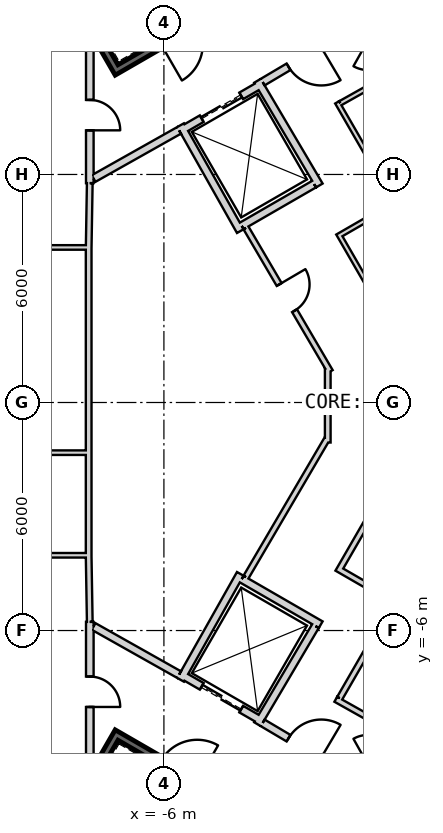
"""IFC4 building model, lengths in metres.
Left out: names, types, materials, properties, quantities, classifications, styles, units other than length and angle.
Written with IfcOpenShell. Run it as: python <this file> out.ifc"""

import sys

from ifc_helpers import new_model, si_unit, direction, frame, frame_2d, origin, place, context, subcontext, project, spatial, rectangle, extrude, element, fill, save


model = new_model("IFC4")
c1 = context("Model", 3, precision=1e-05, world=origin(), true_north=direction((0.0, 1.0)))
c2 = subcontext(c1, "Body", "Model", "MODEL_VIEW")
j1 = project(units=[si_unit("LENGTHUNIT", "METRE"), si_unit("PLANEANGLEUNIT", "RADIAN")], contexts=[c1])
p1 = place(None, origin())
s1 = spatial("IfcSite", under=j1, at=p1, CompositionType="ELEMENT")
p2 = place(p1, origin())
s2 = spatial("IfcBuilding", under=s1, at=p2, CompositionType="ELEMENT")
p3 = place(p2, frame((0.0, 0.0, 410.3)))
s3 = spatial("IfcBuildingStorey", under=s2, at=p3, CompositionType="ELEMENT", Elevation=410.3)
p4 = place(p3, frame((19.475, 2.208, 0.0), z_axis=(0.0, 0.0, 1.0), x_axis=(-0.866028369851, 0.499994862586, 0.0)))
e1 = element("IfcWall", 1, at=p4, inside=s3, PredefinedType="SHEAR", context=c2, shape_type="SweptSolid", body=[
    extrude(rectangle(XDim=31.523, YDim=0.9, at=frame_2d((15.762, 0.0))), origin(), (0.0, 0.0, 1.0), 5.0),
])
p5 = place(p4, frame((3.612, 0.0, 0.0)))
e2 = element("IfcOpeningElement", 2, at=p5, cuts=e1, PredefinedType="OPENING", context=c2, shape_type="SweptSolid", body=[
    extrude(rectangle(XDim=1.2, YDim=2.4, at=frame_2d((0.6, 1.2))), frame((0.0, 0.46, 0.0), z_axis=(0.0, -1.0, 0.0), x_axis=(1.0, 0.0, 0.0)), (0.0, 0.0, 1.0), 0.92),
])
p6 = place(p4, frame((26.712, 0.0, 0.0)))
e3 = element("IfcOpeningElement", 3, at=p6, cuts=e1, PredefinedType="OPENING", context=c2, shape_type="SweptSolid", body=[
    extrude(rectangle(XDim=1.2, YDim=2.4, at=frame_2d((0.6, 1.2))), frame((0.0, 0.46, 0.0), z_axis=(0.0, -1.0, 0.0), x_axis=(1.0, 0.0, 0.0)), (0.0, 0.0, 1.0), 0.92),
])
p7 = place(p3, frame((-7.825, -17.97, 0.0), z_axis=(0.0, 0.0, 1.0), x_axis=(0.866028369851, 0.499994862586, 0.0)))
e4 = element("IfcWall", 4, at=p7, inside=s3, PredefinedType="SHEAR", context=c2, shape_type="SweptSolid", body=[
    extrude(rectangle(XDim=31.523, YDim=0.9, at=frame_2d((15.762, 0.0))), origin(), (0.0, 0.0, 1.0), 5.0),
])
p8 = place(p7, frame((17.862, 0.0, 0.0)))
e5 = element("IfcOpeningElement", 5, at=p8, cuts=e4, PredefinedType="OPENING", context=c2, shape_type="SweptSolid", body=[
    extrude(rectangle(XDim=1.2, YDim=2.4, at=frame_2d((0.6, 1.2))), frame((0.0, 0.46, 0.0), z_axis=(0.0, -1.0, 0.0), x_axis=(1.0, 0.0, 0.0)), (0.0, 0.0, 1.0), 0.92),
])
p9 = place(p7, frame((20.562, 0.0, 0.0)))
e6 = element("IfcOpeningElement", 6, at=p9, cuts=e4, PredefinedType="OPENING", context=c2, shape_type="SweptSolid", body=[
    extrude(rectangle(XDim=1.2, YDim=2.4, at=frame_2d((0.6, 1.2))), frame((0.0, 0.46, 0.0), z_axis=(0.0, -1.0, 0.0), x_axis=(1.0, 0.0, 0.0)), (0.0, 0.0, 1.0), 0.92),
])
p10 = place(p7, frame((26.712, 0.0, 0.0)))
e7 = element("IfcOpeningElement", 7, at=p10, cuts=e4, PredefinedType="OPENING", context=c2, shape_type="SweptSolid", body=[
    extrude(rectangle(XDim=1.2, YDim=2.4, at=frame_2d((0.6, 1.2))), frame((0.0, 0.46, 0.0), z_axis=(0.0, -1.0, 0.0), x_axis=(1.0, 0.0, 0.0)), (0.0, 0.0, 1.0), 0.92),
])
p11 = place(p7, frame((3.612, 0.0, 0.0)))
e8 = element("IfcOpeningElement", 8, at=p11, cuts=e4, PredefinedType="OPENING", context=c2, shape_type="SweptSolid", body=[
    extrude(rectangle(XDim=1.2, YDim=2.4, at=frame_2d((0.6, 1.2))), frame((0.0, 0.46, 0.0), z_axis=(0.0, -1.0, 0.0), x_axis=(1.0, 0.0, 0.0)), (0.0, 0.0, 1.0), 0.92),
])
p12 = place(p3, frame((-1.186, -23.926, 0.0), z_axis=(0.0, 0.0, 1.0), x_axis=(0.824480875731, 0.565889817503, 0.0)))
e9 = element("IfcWall", 9, at=p12, inside=s3, PredefinedType="SOLIDWALL", context=c2, shape_type="SweptSolid", body=[
    extrude(rectangle(XDim=26.064, YDim=0.24, at=frame_2d((13.032, 0.0))), origin(), (0.0, 0.0, 1.0), 4.75),
])
p13 = place(p3, frame((-11.245, 15.678, -0.25), z_axis=(0.0, 0.0, 1.0), x_axis=(0.499977274689, -0.866038523851, 0.0)))
e10 = element("IfcWall", 10, at=p13, inside=s3, PredefinedType="SHEAR", context=c2, shape_type="SweptSolid", body=[
    extrude(rectangle(XDim=8.1, YDim=0.2, at=frame_2d((4.05, 0.0))), origin(), (0.0, 0.0, 1.0), 5.0),
])
p14 = place(p3, frame((-7.159, 8.8, -0.25), z_axis=(0.0, 0.0, 1.0), x_axis=(0.866047807691, 0.499961193289, 0.0)))
e11 = element("IfcWall", 11, at=p14, inside=s3, PredefinedType="SHEAR", context=c2, shape_type="SweptSolid", body=[
    extrude(rectangle(XDim=3.6, YDim=0.2, at=frame_2d((1.8, 0.0))), origin(), (0.0, 0.0, 1.0), 5.0),
])
p15 = place(p14, frame((1.25, 0.0, 0.25)))
e12 = element("IfcOpeningElement", 12, at=p15, cuts=e11, PredefinedType="OPENING", context=c2, shape_type="SweptSolid", body=[
    extrude(rectangle(XDim=1.1, YDim=2.1, at=frame_2d((0.55, 1.05))), frame((0.0, 0.11, 0.0), z_axis=(0.0, -1.0, 0.0), x_axis=(1.0, 0.0, 0.0)), (0.0, 0.0, 1.0), 0.22),
])
p16 = place(p3, frame((-5.524, 7.168, 0.0), z_axis=(0.0, 0.0, 1.0), x_axis=(0.866024647952, 0.500001309137, 0.0)))
e13 = element("IfcWall", 13, at=p16, inside=s3, PredefinedType="PLUMBINGWALL", context=c2, shape_type="SweptSolid", body=[
    extrude(rectangle(XDim=2.4, YDim=0.2, at=frame_2d((1.2, 0.0))), origin(), (0.0, 0.0, 1.0), 4.75),
])
p17 = place(p16, frame((0.6, 0.0, 0.0)))
e14 = element("IfcOpeningElement", 14, at=p17, cuts=e13, PredefinedType="OPENING", context=c2, shape_type="SweptSolid", body=[
    extrude(rectangle(XDim=1.2, YDim=2.4, at=frame_2d((0.6, 1.2))), frame((0.0, 0.11, 0.0), z_axis=(0.0, -1.0, 0.0), x_axis=(1.0, 0.0, 0.0)), (0.0, 0.0, 1.0), 0.22),
])
p18 = place(p3, frame((-2.047, 5.746, 0.0), z_axis=(0.0, 0.0, 1.0), x_axis=(-0.86605622881, -0.499946605688, 0.0)))
e15 = element("IfcWall", 15, at=p18, inside=s3, PredefinedType="PLUMBINGWALL", context=c2, shape_type="SweptSolid", body=[
    extrude(rectangle(XDim=2.2, YDim=0.2, at=frame_2d((1.1, 0.0))), origin(), (0.0, 0.0, 1.0), 4.75),
])
p19 = place(p3, frame((-3.99, 4.509, 0.0), z_axis=(0.0, 0.0, 1.0), x_axis=(-0.491358283181, 0.870957540612, 0.0)))
e16 = element("IfcWall", 16, at=p19, inside=s3, PredefinedType="PLUMBINGWALL", context=c2, shape_type="SweptSolid", body=[
    extrude(rectangle(XDim=3.2, YDim=0.2, at=frame_2d((1.6, 0.0))), origin(), (0.0, 0.0, 1.0), 4.75),
])
p20 = place(p3, frame((-3.538, 8.465, 0.0), z_axis=(0.0, 0.0, 1.0), x_axis=(0.508616218331, -0.860993346345, 0.0)))
e17 = element("IfcWall", 17, at=p20, inside=s3, PredefinedType="PLUMBINGWALL", context=c2, shape_type="SweptSolid", body=[
    extrude(rectangle(XDim=3.2, YDim=0.2, at=frame_2d((1.6, 0.0))), origin(), (0.0, 0.0, 1.0), 4.75),
])
p21 = place(p3, frame((-7.196, -8.663, -0.25), z_axis=(0.0, 0.0, 1.0), x_axis=(-0.499997992926, -0.866026562566, 0.0)))
e18 = element("IfcWall", 18, at=p21, inside=s3, PredefinedType="SHEAR", context=c2, shape_type="SweptSolid", body=[
    extrude(rectangle(XDim=7.9, YDim=0.2, at=frame_2d((3.95, 0.0))), origin(), (0.0, 0.0, 1.0), 5.0),
])
p22 = place(p3, frame((-4.041, -10.599, -0.25), z_axis=(0.0, 0.0, 1.0), x_axis=(-0.866047807691, 0.499961193289, 0.0)))
e19 = element("IfcWall", 19, at=p22, inside=s3, PredefinedType="SHEAR", context=c2, shape_type="SweptSolid", body=[
    extrude(rectangle(XDim=3.6, YDim=0.2, at=frame_2d((1.8, 0.0))), origin(), (0.0, 0.0, 1.0), 5.0),
])
p23 = place(p22, frame((1.25, 0.0, 0.25)))
e20 = element("IfcOpeningElement", 20, at=p23, cuts=e19, PredefinedType="OPENING", context=c2, shape_type="SweptSolid", body=[
    extrude(rectangle(XDim=1.1, YDim=2.1, at=frame_2d((0.55, 1.05))), frame((0.0, 0.11, 0.0), z_axis=(0.0, -1.0, 0.0), x_axis=(1.0, 0.0, 0.0)), (0.0, 0.0, 1.0), 0.22),
])
p24 = place(p3, frame((-3.446, -8.368, 0.0), z_axis=(0.0, 0.0, 1.0), x_axis=(-0.866024647952, 0.500001309137, 0.0)))
e21 = element("IfcWall", 21, at=p24, inside=s3, PredefinedType="PLUMBINGWALL", context=c2, shape_type="SweptSolid", body=[
    extrude(rectangle(XDim=2.4, YDim=0.2, at=frame_2d((1.2, 0.0))), origin(), (0.0, 0.0, 1.0), 4.75),
])
p25 = place(p24, frame((0.6, 0.0, 0.0)))
e22 = element("IfcOpeningElement", 22, at=p25, cuts=e21, PredefinedType="OPENING", context=c2, shape_type="SweptSolid", body=[
    extrude(rectangle(XDim=1.2, YDim=2.4, at=frame_2d((0.6, 1.2))), frame((0.0, 0.11, 0.0), z_axis=(0.0, -1.0, 0.0), x_axis=(1.0, 0.0, 0.0)), (0.0, 0.0, 1.0), 0.22),
])
p26 = place(p3, frame((-5.562, -7.296, 0.0), z_axis=(0.0, 0.0, 1.0), x_axis=(0.491358283181, 0.870957540612, 0.0)))
e23 = element("IfcWall", 23, at=p26, inside=s3, PredefinedType="PLUMBINGWALL", context=c2, shape_type="SweptSolid", body=[
    extrude(rectangle(XDim=3.2, YDim=0.2, at=frame_2d((1.6, 0.0))), origin(), (0.0, 0.0, 1.0), 4.75),
])
p27 = place(p3, frame((-3.953, -4.646, 0.0), z_axis=(0.0, 0.0, 1.0), x_axis=(0.866024647952, -0.500001309137, 0.0)))
e24 = element("IfcWall", 24, at=p27, inside=s3, PredefinedType="PLUMBINGWALL", context=c2, shape_type="SweptSolid", body=[
    extrude(rectangle(XDim=2.4, YDim=0.2, at=frame_2d((1.2, 0.0))), origin(), (0.0, 0.0, 1.0), 4.75),
])
p28 = place(p3, frame((-2.012, -5.882, 0.0), z_axis=(0.0, 0.0, 1.0), x_axis=(-0.508619639323, -0.860991325447, 0.0)))
e25 = element("IfcWall", 25, at=p28, inside=s3, PredefinedType="PLUMBINGWALL", context=c2, shape_type="SweptSolid", body=[
    extrude(rectangle(XDim=3.0, YDim=0.2, at=frame_2d((1.5, 0.0))), origin(), (0.0, 0.0, 1.0), 4.75),
])
p29 = place(p3, frame((-11.2, 4.08, 0.0), z_axis=(0.0, 0.0, 1.0), x_axis=(1.0, 0.0, 0.0)))
e26 = element("IfcWall", 26, at=p29, inside=s3, PredefinedType="PARTITIONING", context=c2, shape_type="SweptSolid", body=[
    extrude(rectangle(XDim=3.25, YDim=0.12, at=frame_2d((1.625, 0.0))), origin(), (0.0, 0.0, 1.0), 4.75),
])
p30 = place(p29, frame((1.225, 0.0, 0.0)))
e27 = element("IfcOpeningElement", 27, at=p30, cuts=e26, PredefinedType="OPENING", context=c2, shape_type="SweptSolid", body=[
    extrude(rectangle(XDim=0.8, YDim=2.1, at=frame_2d((0.4, 1.05))), frame((0.0, 0.07, 0.0), z_axis=(0.0, -1.0, 0.0), x_axis=(1.0, 0.0, 0.0)), (0.0, 0.0, 1.0), 0.14),
])
p31 = place(p3, frame((-7.95, -9.55, 0.0), z_axis=(0.0, 0.0, 1.0), x_axis=(0.0, 1.0, 0.0)))
e28 = element("IfcWall", 28, at=p31, inside=s3, PredefinedType="PARTITIONING", context=c2, shape_type="SweptSolid", body=[
    extrude(rectangle(XDim=3.778, YDim=0.2, at=frame_2d((1.889, 0.0))), origin(), (0.0, 0.0, 1.0), 4.75),
])
p32 = place(p31, frame((1.539, 0.0, 0.0)))
e29 = element("IfcOpeningElement", 29, at=p32, cuts=e28, PredefinedType="OPENING", context=c2, shape_type="SweptSolid", body=[
    extrude(rectangle(XDim=0.8, YDim=2.1, at=frame_2d((0.4, 1.05))), frame((0.0, 0.11, 0.0), z_axis=(0.0, -1.0, 0.0), x_axis=(1.0, 0.0, 0.0)), (0.0, 0.0, 1.0), 0.22),
])
p33 = place(p3, frame((-7.95, 5.772, 0.0), z_axis=(0.0, 0.0, 1.0), x_axis=(0.0, 1.0, 0.0)))
e30 = element("IfcWall", 30, at=p33, inside=s3, PredefinedType="PARTITIONING", context=c2, shape_type="SweptSolid", body=[
    extrude(rectangle(XDim=3.578, YDim=0.2, at=frame_2d((1.789, 0.0))), origin(), (0.0, 0.0, 1.0), 4.75),
])
p34 = place(p33, frame((1.389, 0.0, 0.0)))
e31 = element("IfcOpeningElement", 31, at=p34, cuts=e30, PredefinedType="OPENING", context=c2, shape_type="SweptSolid", body=[
    extrude(rectangle(XDim=0.8, YDim=2.1, at=frame_2d((0.4, 1.05))), frame((0.0, 0.11, 0.0), z_axis=(0.0, -1.0, 0.0), x_axis=(1.0, 0.0, 0.0)), (0.0, 0.0, 1.0), 0.22),
])
p35 = place(p3, frame((-7.951, 5.772, 0.0), z_axis=(0.0, 0.0, 1.0), x_axis=(-0.016723387416, -0.999860154378, 0.0)))
e32 = element("IfcWall", 32, at=p35, inside=s3, PredefinedType="PLUMBINGWALL", context=c2, shape_type="SweptSolid", body=[
    extrude(rectangle(XDim=1.723, YDim=0.15, at=frame_2d((0.861, 0.0))), origin(), (0.0, 0.0, 1.0), 4.75),
])
p36 = place(p3, frame((-11.2, -1.32, 0.0), z_axis=(0.0, 0.0, 1.0), x_axis=(1.0, 0.0, 0.0)))
e33 = element("IfcWall", 33, at=p36, inside=s3, PredefinedType="PARTITIONING", context=c2, shape_type="SweptSolid", body=[
    extrude(rectangle(XDim=3.25, YDim=0.12, at=frame_2d((1.625, 0.0))), origin(), (0.0, 0.0, 1.0), 4.75),
])
p37 = place(p36, frame((1.225, 0.0, 0.0)))
e34 = element("IfcOpeningElement", 34, at=p37, cuts=e33, PredefinedType="OPENING", context=c2, shape_type="SweptSolid", body=[
    extrude(rectangle(XDim=0.8, YDim=2.1, at=frame_2d((0.4, 1.05))), frame((0.0, 0.07, 0.0), z_axis=(0.0, -1.0, 0.0), x_axis=(1.0, 0.0, 0.0)), (0.0, 0.0, 1.0), 0.14),
])
p38 = place(p3, frame((-7.98, 4.05, 0.0), z_axis=(0.0, 0.0, 1.0), x_axis=(0.0, -1.0, 0.0)))
e35 = element("IfcWall", 35, at=p38, inside=s3, PredefinedType="PLUMBINGWALL", context=c2, shape_type="SweptSolid", body=[
    extrude(rectangle(XDim=8.1, YDim=0.15, at=frame_2d((4.05, 0.0))), origin(), (0.0, 0.0, 1.0), 4.75),
])
p39 = place(p3, frame((-7.95, -4.02, 0.0), z_axis=(0.0, 0.0, 1.0), x_axis=(-1.0, 0.0, 0.0)))
e36 = element("IfcWall", 36, at=p39, inside=s3, PredefinedType="PARTITIONING", context=c2, shape_type="SweptSolid", body=[
    extrude(rectangle(XDim=3.25, YDim=0.12, at=frame_2d((1.625, 0.0))), origin(), (0.0, 0.0, 1.0), 4.75),
])
p40 = place(p3, frame((-7.98, -4.05, 0.0), z_axis=(0.0, 0.0, 1.0), x_axis=(0.016723387416, -0.999860154378, 0.0)))
e37 = element("IfcWall", 37, at=p40, inside=s3, PredefinedType="PLUMBINGWALL", context=c2, shape_type="SweptSolid", body=[
    extrude(rectangle(XDim=1.723, YDim=0.15, at=frame_2d((0.861, 0.0))), origin(), (0.0, 0.0, 1.0), 4.75),
])
p41 = place(p3, frame((-1.024, 9.772, 0.0), z_axis=(0.0, 0.0, 1.0), x_axis=(0.871968924608, -0.489561226527, 0.0)))
e38 = element("IfcWall", 38, at=p41, inside=s3, PredefinedType="PARTITIONING", context=c2, shape_type="SweptSolid", body=[
    extrude(rectangle(XDim=1.722, YDim=0.12, at=frame_2d((0.861, 0.0))), origin(), (0.0, 0.0, 1.0), 4.75),
])
p42 = place(p41, frame((0.461, 0.0, 0.0)))
e39 = element("IfcOpeningElement", 39, at=p42, cuts=e38, PredefinedType="OPENING", context=c2, shape_type="SweptSolid", body=[
    extrude(rectangle(XDim=0.8, YDim=2.1, at=frame_2d((0.4, 1.05))), frame((0.0, 0.07, 0.0), z_axis=(0.0, -1.0, 0.0), x_axis=(1.0, 0.0, 0.0)), (0.0, 0.0, 1.0), 0.14),
])
p43 = place(p3, frame((0.478, -8.928, 0.0), z_axis=(0.0, 0.0, 1.0), x_axis=(-0.871968924608, -0.489561226527, 0.0)))
e40 = element("IfcWall", 40, at=p43, inside=s3, PredefinedType="PARTITIONING", context=c2, shape_type="SweptSolid", body=[
    extrude(rectangle(XDim=1.722, YDim=0.12, at=frame_2d((0.861, 0.0))), origin(), (0.0, 0.0, 1.0), 4.75),
])
p44 = place(p43, frame((0.461, 0.0, 0.0)))
e41 = element("IfcOpeningElement", 41, at=p44, cuts=e40, PredefinedType="OPENING", context=c2, shape_type="SweptSolid", body=[
    extrude(rectangle(XDim=0.8, YDim=2.1, at=frame_2d((0.4, 1.05))), frame((0.0, 0.07, 0.0), z_axis=(0.0, -1.0, 0.0), x_axis=(1.0, 0.0, 0.0)), (0.0, 0.0, 1.0), 0.14),
])
p45 = place(p3, frame((-5.6, 7.16, 0.0), z_axis=(0.0, 0.0, 1.0), x_axis=(-0.871350695252, -0.490660744185, 0.0)))
e42 = element("IfcWall", 42, at=p45, inside=s3, PredefinedType="PARTITIONING", context=c2, shape_type="SweptSolid", body=[
    extrude(rectangle(XDim=2.582, YDim=0.2, at=frame_2d((1.291, 0.0))), origin(), (0.0, 0.0, 1.0), 4.75),
])
p46 = place(p3, frame((-1.179, 9.745, 0.0), z_axis=(0.0, 0.0, 1.0), x_axis=(-0.860630814782, -0.509229418482, 0.0)))
e43 = element("IfcWall", 43, at=p46, inside=s3, PredefinedType="PARTITIONING", context=c2, shape_type="SweptSolid", body=[
    extrude(rectangle(XDim=2.582, YDim=0.2, at=frame_2d((1.291, 0.0))), origin(), (0.0, 0.0, 1.0), 4.75),
])
p47 = place(p46, frame((0.791, 0.0, 0.0)))
e44 = element("IfcOpeningElement", 44, at=p47, cuts=e43, PredefinedType="OPENING", context=c2, shape_type="SweptSolid", body=[
    extrude(rectangle(XDim=1.0, YDim=2.1, at=frame_2d((0.5, 1.05))), frame((0.0, 0.11, 0.0), z_axis=(0.0, -1.0, 0.0), x_axis=(1.0, 0.0, 0.0)), (0.0, 0.0, 1.0), 0.22),
])
p48 = place(p3, frame((-7.85, -5.893, 0.0), z_axis=(0.0, 0.0, 1.0), x_axis=(0.871350695252, -0.490660744185, 0.0)))
e45 = element("IfcWall", 45, at=p48, inside=s3, PredefinedType="PARTITIONING", context=c2, shape_type="SweptSolid", body=[
    extrude(rectangle(XDim=2.582, YDim=0.2, at=frame_2d((1.291, 0.0))), origin(), (0.0, 0.0, 1.0), 4.75),
])
p49 = place(p3, frame((-3.401, -8.43, 0.0), z_axis=(0.0, 0.0, 1.0), x_axis=(0.860630814782, -0.509229418482, 0.0)))
e46 = element("IfcWall", 46, at=p49, inside=s3, PredefinedType="PARTITIONING", context=c2, shape_type="SweptSolid", body=[
    extrude(rectangle(XDim=2.582, YDim=0.2, at=frame_2d((1.291, 0.0))), origin(), (0.0, 0.0, 1.0), 4.75),
])
p50 = place(p49, frame((0.791, 0.0, 0.0)))
e47 = element("IfcOpeningElement", 47, at=p50, cuts=e46, PredefinedType="OPENING", context=c2, shape_type="SweptSolid", body=[
    extrude(rectangle(XDim=1.0, YDim=2.1, at=frame_2d((0.5, 1.05))), frame((0.0, 0.11, 0.0), z_axis=(0.0, -1.0, 0.0), x_axis=(1.0, 0.0, 0.0)), (0.0, 0.0, 1.0), 0.22),
])
p51 = place(p3, frame((-1.624, 0.815, 0.0), z_axis=(0.0, 0.0, 1.0), x_axis=(-0.505868173579, 0.862610799237, 0.0)))
e48 = element("IfcWall", 48, at=p51, inside=s3, PredefinedType="PLUMBINGWALL", context=c2, shape_type="SweptSolid", body=[
    extrude(rectangle(XDim=4.383, YDim=0.15, at=frame_2d((2.191, 0.0))), origin(), (0.0, 0.0, 1.0), 4.75),
])
p52 = place(p51, frame((1.855, 0.0, 0.0)))
e49 = element("IfcOpeningElement", 49, at=p52, cuts=e48, PredefinedType="OPENING", context=c2, shape_type="SweptSolid", body=[
    extrude(rectangle(XDim=0.8, YDim=2.1, at=frame_2d((0.4, 1.05))), frame((0.0, 0.085, 0.0), z_axis=(0.0, -1.0, 0.0), x_axis=(1.0, 0.0, 0.0)), (0.0, 0.0, 1.0), 0.17),
])
p53 = place(p3, frame((-1.689, -1.053, 0.0), z_axis=(0.0, 0.0, 1.0), x_axis=(0.0, 1.0, 0.0)))
e50 = element("IfcWall", 50, at=p53, inside=s3, PredefinedType="PLUMBINGWALL", context=c2, shape_type="SweptSolid", body=[
    extrude(rectangle(XDim=1.954, YDim=0.15, at=frame_2d((0.977, 0.0))), origin(), (0.0, 0.0, 1.0), 4.75),
])
p54 = place(p3, frame((-3.841, -4.595, 0.0), z_axis=(0.0, 0.0, 1.0), x_axis=(0.505857207696, 0.862617229959, 0.0)))
e51 = element("IfcWall", 51, at=p54, inside=s3, PredefinedType="PLUMBINGWALL", context=c2, shape_type="SweptSolid", body=[
    extrude(rectangle(XDim=4.231, YDim=0.15, at=frame_2d((2.116, 0.0))), origin(), (0.0, 0.0, 1.0), 4.75),
])
p55 = place(p3, frame((-1.477, -7.808, 0.0), z_axis=(0.0, 0.0, 1.0), x_axis=(0.871822901869, -0.48982122022, 0.0)))
e52 = element("IfcWall", 52, at=p55, inside=s3, PredefinedType="PLUMBINGWALL", context=c2, shape_type="SweptSolid", body=[
    extrude(rectangle(XDim=2.24, YDim=0.15, at=frame_2d((1.12, 0.0))), origin(), (0.0, 0.0, 1.0), 4.75),
])
p56 = place(p3, frame((0.126, -5.182, 0.0), z_axis=(0.0, 0.0, 1.0), x_axis=(-0.499990139034, -0.866031096941, 0.0)))
e53 = element("IfcWall", 53, at=p56, inside=s3, PredefinedType="PLUMBINGWALL", context=c2, shape_type="SweptSolid", body=[
    extrude(rectangle(XDim=3.0, YDim=0.15, at=frame_2d((1.5, 0.0))), origin(), (0.0, 0.0, 1.0), 4.75),
])
p57 = place(p3, frame((-1.449, -4.36, 0.0), z_axis=(0.0, 0.0, 1.0), x_axis=(0.866025371046, -0.500000056704, 0.0)))
e54 = element("IfcWall", 54, at=p57, inside=s3, PredefinedType="PLUMBINGWALL", context=c2, shape_type="SweptSolid", body=[
    extrude(rectangle(XDim=1.7, YDim=0.15, at=frame_2d((0.85, 0.0))), origin(), (0.0, 0.0, 1.0), 4.75),
])
p58 = place(p3, frame((0.108, -1.812, 0.0), z_axis=(0.0, 0.0, 1.0), x_axis=(-0.49994762993, -0.866055637547, 0.0)))
e55 = element("IfcWall", 55, at=p58, inside=s3, PredefinedType="PLUMBINGWALL", context=c2, shape_type="SweptSolid", body=[
    extrude(rectangle(XDim=2.909, YDim=0.15, at=frame_2d((1.455, 0.0))), origin(), (0.0, 0.0, 1.0), 4.75),
])
p59 = place(p3, frame((-1.414, 4.449, 0.0), z_axis=(0.0, 0.0, 1.0), x_axis=(0.500028961621, -0.866008682139, 0.0)))
e56 = element("IfcWall", 56, at=p59, inside=s3, PredefinedType="PARTITIONING", context=c2, shape_type="SweptSolid", body=[
    extrude(rectangle(XDim=2.896, YDim=0.12, at=frame_2d((1.448, 0.0))), origin(), (0.0, 0.0, 1.0), 4.75),
])
p60 = place(p3, frame((0.14, 5.277, 0.0), z_axis=(0.0, 0.0, 1.0), x_axis=(-0.865989465428, -0.500062241894, 0.0)))
e57 = element("IfcWall", 57, at=p60, inside=s3, PredefinedType="PARTITIONING", context=c2, shape_type="SweptSolid", body=[
    extrude(rectangle(XDim=1.7, YDim=0.12, at=frame_2d((0.85, 0.0))), origin(), (0.0, 0.0, 1.0), 4.75),
])
p61 = place(p3, frame((-1.442, 7.897, 0.0), z_axis=(0.0, 0.0, 1.0), x_axis=(0.499990139034, -0.866031096941, 0.0)))
e58 = element("IfcWall", 58, at=p61, inside=s3, PredefinedType="PARTITIONING", context=c2, shape_type="SweptSolid", body=[
    extrude(rectangle(XDim=3.0, YDim=0.12, at=frame_2d((1.5, 0.0))), origin(), (0.0, 0.0, 1.0), 4.75),
])
p62 = place(p3, frame((0.475, 8.905, 0.0), z_axis=(0.0, 0.0, 1.0), x_axis=(-0.871832572129, -0.489804007921, 0.0)))
e59 = element("IfcWall", 59, at=p62, inside=s3, PredefinedType="PARTITIONING", context=c2, shape_type="SweptSolid", body=[
    extrude(rectangle(XDim=2.104, YDim=0.12, at=frame_2d((1.052, 0.0))), origin(), (0.0, 0.0, 1.0), 4.75),
])
p63 = place(p47, origin())
e60 = element("IfcDoor", 60, at=p63, inside=s3, OperationType="SINGLE_SWING_LEFT", PredefinedType="USERDEFINED", context=c2, shape_type="SweptSolid", body=[
    extrude(rectangle(XDim=1.0, YDim=2.1, at=frame_2d((0.5, 1.05))), frame((0.0, 0.025, 0.0), z_axis=(0.0, -1.0, 0.0), x_axis=(1.0, 0.0, 0.0)), (0.0, 0.0, 1.0), 0.05),
])
fill(e44, e60)
p64 = place(p17, origin())
e61 = element("IfcDoor", 61, at=p64, inside=s3, OperationType="SLIDING_TO_LEFT", PredefinedType="USERDEFINED", context=c2, shape_type="SweptSolid", body=[
    extrude(rectangle(XDim=1.2, YDim=2.4, at=frame_2d((0.6, 1.2))), frame((0.0, 0.025, 0.0), z_axis=(0.0, -1.0, 0.0), x_axis=(1.0, 0.0, 0.0)), (0.0, 0.0, 1.0), 0.05),
])
fill(e14, e61)
p65 = place(p50, origin())
e62 = element("IfcDoor", 62, at=p65, inside=s3, OperationType="SINGLE_SWING_RIGHT", PredefinedType="USERDEFINED", context=c2, shape_type="SweptSolid", body=[
    extrude(rectangle(XDim=1.0, YDim=2.1, at=frame_2d((0.5, 1.05))), frame((0.0, 0.025, 0.0), z_axis=(0.0, -1.0, 0.0), x_axis=(1.0, 0.0, 0.0)), (0.0, 0.0, 1.0), 0.05),
])
fill(e47, e62)
p66 = place(p25, origin())
e63 = element("IfcDoor", 63, at=p66, inside=s3, OperationType="SLIDING_TO_LEFT", PredefinedType="USERDEFINED", context=c2, shape_type="SweptSolid", body=[
    extrude(rectangle(XDim=1.2, YDim=2.4, at=frame_2d((0.6, 1.2))), frame((0.0, 0.025, 0.0), z_axis=(0.0, -1.0, 0.0), x_axis=(1.0, 0.0, 0.0)), (0.0, 0.0, 1.0), 0.05),
])
fill(e22, e63)
p67 = place(p52, origin())
e64 = element("IfcDoor", 64, at=p67, inside=s3, OperationType="SINGLE_SWING_RIGHT", PredefinedType="USERDEFINED", context=c2, shape_type="SweptSolid", body=[
    extrude(rectangle(XDim=0.8, YDim=2.1, at=frame_2d((0.4, 1.05))), frame((0.0, 0.025, 0.0), z_axis=(0.0, -1.0, 0.0), x_axis=(1.0, 0.0, 0.0)), (0.0, 0.0, 1.0), 0.05),
])
fill(e49, e64)
p68 = place(p34, origin())
e65 = element("IfcDoor", 65, at=p68, inside=s3, OperationType="SINGLE_SWING_LEFT", PredefinedType="USERDEFINED", context=c2, shape_type="SweptSolid", body=[
    extrude(rectangle(XDim=0.8, YDim=2.1, at=frame_2d((0.4, 1.05))), frame((0.0, 0.025, 0.0), z_axis=(0.0, -1.0, 0.0), x_axis=(1.0, 0.0, 0.0)), (0.0, 0.0, 1.0), 0.05),
])
fill(e31, e65)
p69 = place(p32, origin())
e66 = element("IfcDoor", 66, at=p69, inside=s3, OperationType="SINGLE_SWING_LEFT", PredefinedType="USERDEFINED", context=c2, shape_type="SweptSolid", body=[
    extrude(rectangle(XDim=0.8, YDim=2.1, at=frame_2d((0.4, 1.05))), frame((0.0, 0.025, 0.0), z_axis=(0.0, -1.0, 0.0), x_axis=(1.0, 0.0, 0.0)), (0.0, 0.0, 1.0), 0.05),
])
fill(e29, e66)
save(model, sys.argv[1])
